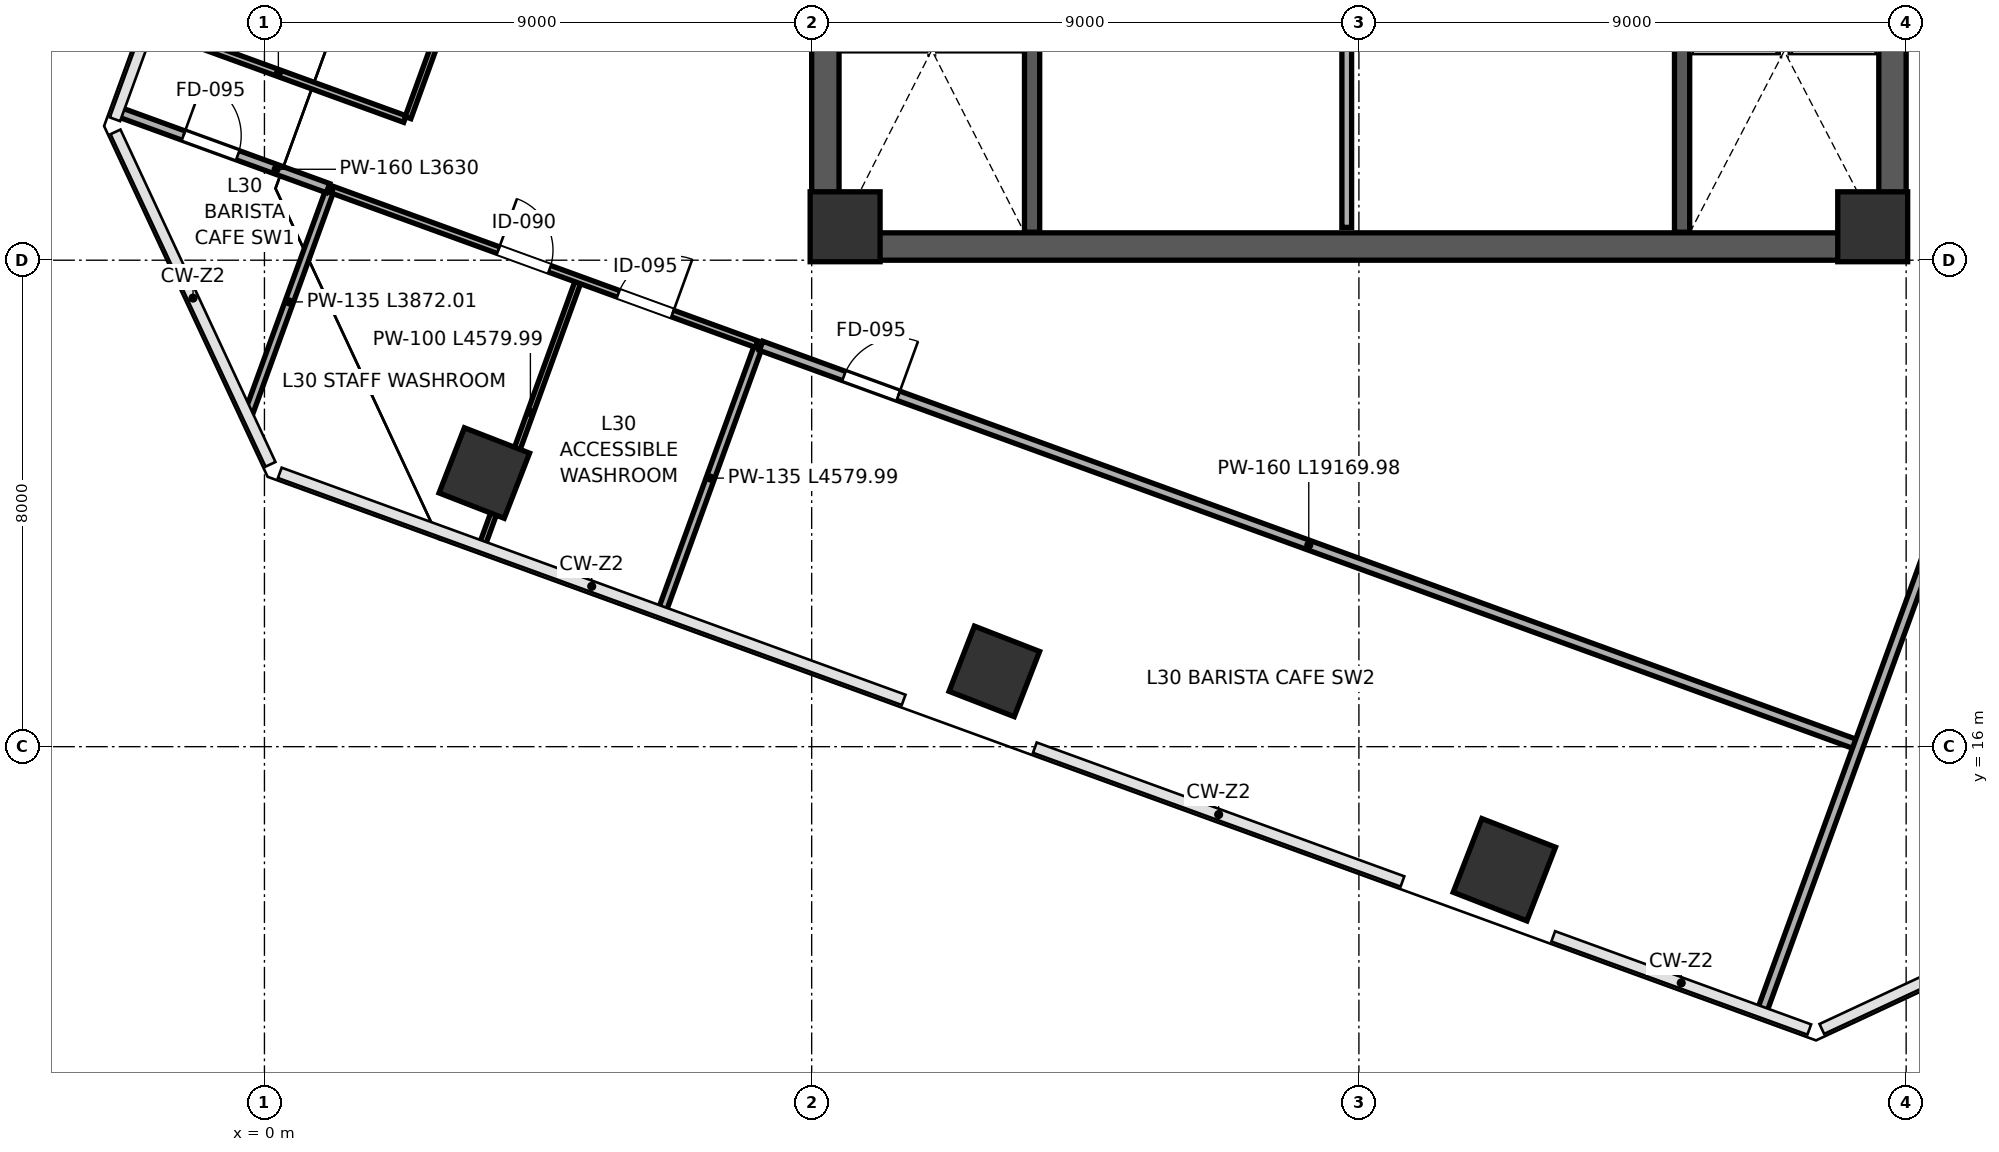
"""IFC4 building model, lengths in metres.
Left out: names, types, materials, properties, quantities, classifications, styles, units other than length and angle.
Written with IfcOpenShell. Run it as: python <this file> out.ifc"""

import sys

from ifc_helpers import new_model, si_unit, direction, frame, frame_2d, origin, origin_2d, place, context, subcontext, project, spatial, rectangle, extrude, clip, halfspace, source, transform, mapped, element, fill, save


model = new_model("IFC4")
c1 = context("Model", 3, precision=1e-05, world=origin(), true_north=direction((0.0, 1.0)))
c2 = subcontext(c1, "Body", "Model", "MODEL_VIEW")
j1 = project(units=[si_unit("LENGTHUNIT", "METRE"), si_unit("PLANEANGLEUNIT", "RADIAN")], contexts=[c1])
p1 = place(None, origin())
s1 = spatial("IfcSite", under=j1, at=p1, CompositionType="ELEMENT")
p2 = place(p1, origin())
s2 = spatial("IfcBuilding", under=s1, at=p2, CompositionType="ELEMENT")
p3 = place(p2, frame((0.0, 0.0, 137.2)))
s3 = spatial("IfcBuildingStorey", under=s2, at=p3, CompositionType="ELEMENT", Elevation=137.2)
m1 = source(origin(), c2, "Body", "SweptSolid", [
    extrude(rectangle(XDim=1.15, YDim=1.15, at=origin_2d()), origin(), (0.0, 0.0, 1.0), 4.198),
])
for number, where, z_axis, x_axis in (
    (1, (9.55, 24.55, 0.001), (0.0, 0.0, 1.0), (1.0, 0.0, 0.0)),
    (2, (26.45, 24.55, 0.001), (0.0, 0.0, 1.0), (1.0, 0.0, 0.0)),
):
    element("IfcColumn", number, at=place(p3, frame(where, z_axis=z_axis, x_axis=x_axis)), inside=s3, PredefinedType="COLUMN", context=c2, shape_type="MappedRepresentation", body=[
        mapped(m1, transform((0.0, 0.0, 0.0), scale=1.0)),
    ])
p4 = place(p3, frame((3.616, 20.5, 0.0), z_axis=(-0.058355947415, 0.092965068704, 0.993957785523), x_axis=(0.980902267341, 0.190389366909, 0.039782293708)))
e3 = element("IfcColumn", 3, at=p4, inside=s3, PredefinedType="COLUMN", context=c2, shape_type="Clipping", body=[
    clip(clip(extrude(rectangle(XDim=1.15, YDim=1.15, at=origin_2d()), origin(), (0.0, 0.0, 1.0), 4.226), halfspace(frame((0.0, 0.0, 0.083), z_axis=(0.0, 0.0, -1.0), x_axis=(1.0, 0.0, 0.0)), False)), halfspace(frame((0.0, 0.0, 4.143), z_axis=(0.0, 0.0, 1.0), x_axis=(1.0, 0.0, 0.0)), False)),
])
p5 = place(p3, frame((12.004, 17.238, 0.0), z_axis=(-0.075777308452, 0.049958607482, 0.995872450197), x_axis=(0.814345068086, 0.57944796761, 0.032896244729)))
e4 = element("IfcColumn", 4, at=p5, inside=s3, PredefinedType="COLUMN", context=c2, shape_type="Clipping", body=[
    clip(clip(extrude(rectangle(XDim=1.15, YDim=1.15, at=origin_2d()), origin(), (0.0, 0.0, 1.0), 4.217), halfspace(frame((0.0, 0.0, 0.069), z_axis=(0.0, 0.0, -1.0), x_axis=(1.0, 0.0, 0.0)), False)), halfspace(frame((0.0, 0.0, 4.149), z_axis=(0.0, 0.0, 1.0), x_axis=(1.0, 0.0, 0.0)), False)),
])
p6 = place(p3, frame((20.392, 13.976, 0.0), z_axis=(-0.093121667883, 0.006713557162, 0.995632102295), x_axis=(0.426939463159, 0.903646864246, 0.03383843283)))
e5 = element("IfcColumn", 5, at=p6, inside=s3, PredefinedType="COLUMN", context=c2, shape_type="Clipping", body=[
    clip(clip(extrude(rectangle(XDim=1.3, YDim=1.3, at=origin_2d()), origin(), (0.0, 0.0, 1.0), 4.218), halfspace(frame((0.0, 0.0, 0.08), z_axis=(0.0, 0.0, -1.0), x_axis=(1.0, 0.0, 0.0)), False)), halfspace(frame((0.0, 0.0, 4.139), z_axis=(0.0, 0.0, 1.0), x_axis=(1.0, 0.0, 0.0)), False)),
])
p7 = place(p3, frame((9.225, 24.45, 0.0), z_axis=(0.0, 0.0, 1.0), x_axis=(0.0, 1.0, 0.0)))
e6 = element("IfcWall", 6, at=p7, inside=s3, PredefinedType="SHEAR", context=c2, shape_type="SweptSolid", body=[
    extrude(rectangle(XDim=15.1, YDim=0.45, at=frame_2d((7.55, 0.0))), origin(), (0.0, 0.0, 1.0), 3.96),
])
p8 = place(p3, frame((26.775, 24.45, 0.0), z_axis=(0.0, 0.0, 1.0), x_axis=(0.0, 1.0, 0.0)))
e7 = element("IfcWall", 7, at=p8, inside=s3, PredefinedType="SHEAR", context=c2, shape_type="SweptSolid", body=[
    extrude(rectangle(XDim=15.1, YDim=0.45, at=frame_2d((7.55, 0.0))), origin(), (0.0, 0.0, 1.0), 3.96),
])
p9 = place(p8, frame((8.6, 0.0, 0.0)))
e8 = element("IfcOpeningElement", 8, at=p9, cuts=e7, PredefinedType="OPENING", context=c2, shape_type="SweptSolid", body=[
    extrude(rectangle(XDim=1.15, YDim=2.2, at=frame_2d((0.575, 1.1))), frame((0.0, 0.235, 0.0), z_axis=(0.0, -1.0, 0.0), x_axis=(1.0, 0.0, 0.0)), (0.0, 0.0, 1.0), 0.47),
])
p10 = place(p3, frame((9.0, 24.225, 0.0), z_axis=(0.0, 0.0, 1.0), x_axis=(1.0, 0.0, 0.0)))
e9 = element("IfcWall", 9, at=p10, inside=s3, PredefinedType="SHEAR", context=c2, shape_type="SweptSolid", body=[
    extrude(rectangle(XDim=18.0, YDim=0.45, at=frame_2d((9.0, 0.0))), origin(), (0.0, 0.0, 1.0), 3.96),
])
p11 = place(p3, frame((12.625, 24.46, 0.0), z_axis=(0.0, 0.0, 1.0), x_axis=(0.0, 1.0, 0.0)))
e10 = element("IfcWall", 10, at=p11, inside=s3, PredefinedType="SHEAR", context=c2, shape_type="SweptSolid", body=[
    extrude(rectangle(XDim=7.49, YDim=0.25, at=frame_2d((3.745, 0.0))), origin(), (0.0, 0.0, 1.0), 3.96),
])
p12 = place(p11, frame((5.85, 0.0, 0.0)))
e11 = element("IfcOpeningElement", 11, at=p12, cuts=e10, PredefinedType="OPENING", context=c2, shape_type="SweptSolid", body=[
    extrude(rectangle(XDim=1.15, YDim=2.2, at=frame_2d((0.575, 1.1))), frame((0.0, 0.135, 0.0), z_axis=(0.0, -1.0, 0.0), x_axis=(1.0, 0.0, 0.0)), (0.0, 0.0, 1.0), 0.27),
])
p13 = place(p3, frame((23.315, 24.46, 0.0), z_axis=(0.0, 0.0, 1.0), x_axis=(0.0, 1.0, 0.0)))
e12 = element("IfcWall", 12, at=p13, inside=s3, PredefinedType="SHEAR", context=c2, shape_type="SweptSolid", body=[
    extrude(rectangle(XDim=7.49, YDim=0.25, at=frame_2d((3.745, 0.0))), origin(), (0.0, 0.0, 1.0), 3.96),
])
p14 = place(p3, frame((17.8, 24.54, 0.0), z_axis=(0.0, 0.0, 1.0), x_axis=(0.0, 1.0, 0.0)))
e13 = element("IfcWall", 13, at=p14, inside=s3, PredefinedType="PARTITIONING", context=c2, shape_type="SweptSolid", body=[
    extrude(rectangle(XDim=4.6, YDim=0.16, at=frame_2d((2.3, 0.0))), origin(), (0.0, 0.0, 1.0), 3.96),
])
p15 = place(p3, frame((-0.255, 21.495, 0.0), z_axis=(0.0, 0.0, 1.0), x_axis=(0.342006312725, 0.939697654598, 0.0)))
e14 = element("IfcWall", 14, at=p15, inside=s3, PredefinedType="PARTITIONING", context=c2, shape_type="SweptSolid", body=[
    extrude(rectangle(XDim=3.872, YDim=0.135, at=frame_2d((1.936, 0.0))), origin(), (0.0, 0.0, 1.0), 3.96),
])
p16 = place(p3, frame((-2.365, 26.427, 0.0), z_axis=(0.0, 0.0, 1.0), x_axis=(0.939671610829, -0.342077862192, 0.0)))
e15 = element("IfcWall", 15, at=p16, inside=s3, PredefinedType="PARTITIONING", context=c2, shape_type="SweptSolid", body=[
    extrude(rectangle(XDim=3.63, YDim=0.16, at=frame_2d((1.815, 0.0))), origin(), (0.0, 0.0, 1.0), 3.96),
])
p17 = place(p16, frame((1.1, 0.0, 0.0)))
e16 = element("IfcOpeningElement", 16, at=p17, cuts=e15, PredefinedType="OPENING", context=c2, shape_type="SweptSolid", body=[
    extrude(rectangle(XDim=0.95, YDim=2.15, at=frame_2d((0.475, 1.075))), frame((0.0, 0.09, 0.0), z_axis=(0.0, -1.0, 0.0), x_axis=(1.0, 0.0, 0.0)), (0.0, 0.0, 1.0), 0.18),
])
p18 = place(p3, frame((3.591, 19.342, 0.0), z_axis=(0.0, 0.0, 1.0), x_axis=(0.341969903355, 0.939710905119, 0.0)))
e17 = element("IfcWall", 17, at=p18, inside=s3, PredefinedType="PARTITIONING", context=c2, shape_type="SweptSolid", body=[
    extrude(rectangle(XDim=4.58, YDim=0.1, at=frame_2d((2.29, 0.0))), origin(), (0.0, 0.0, 1.0), 3.195),
])
p19 = place(p3, frame((6.551, 18.265, 0.0), z_axis=(0.0, 0.0, 1.0), x_axis=(0.342016975922, 0.939693773621, 0.0)))
e18 = element("IfcWall", 18, at=p19, inside=s3, PredefinedType="PARTITIONING", context=c2, shape_type="SweptSolid", body=[
    extrude(rectangle(XDim=4.58, YDim=0.135, at=frame_2d((2.29, 0.0))), origin(), (0.0, 0.0, 1.0), 3.195),
])
p20 = place(p3, frame((1.121, 25.157, 0.0), z_axis=(0.0, 0.0, 1.0), x_axis=(0.939692513883, -0.342020437038, 0.0)))
e19 = element("IfcWall", 19, at=p20, inside=s3, PredefinedType="PARTITIONING", context=c2, shape_type="SweptSolid", body=[
    extrude(rectangle(XDim=7.42, YDim=0.115, at=frame_2d((3.71, 0.0))), origin(), (0.0, 0.0, 1.0), 3.96),
])
p21 = place(p20, frame((2.9, 0.0, 0.0)))
e20 = element("IfcOpeningElement", 20, at=p21, cuts=e19, PredefinedType="OPENING", context=c2, shape_type="SweptSolid", body=[
    extrude(rectangle(XDim=0.9, YDim=2.15, at=frame_2d((0.45, 1.075))), frame((0.0, 0.067, 0.0), z_axis=(0.0, -1.0, 0.0), x_axis=(1.0, 0.0, 0.0)), (0.0, 0.0, 1.0), 0.135),
])
p22 = place(p20, frame((5.0, 0.0, 0.0)))
e21 = element("IfcOpeningElement", 21, at=p22, cuts=e19, PredefinedType="OPENING", context=c2, shape_type="SweptSolid", body=[
    extrude(rectangle(XDim=0.95, YDim=2.15, at=frame_2d((0.475, 1.075))), frame((0.0, 0.067, 0.0), z_axis=(0.0, -1.0, 0.0), x_axis=(1.0, 0.0, 0.0)), (0.0, 0.0, 1.0), 0.135),
])
p23 = place(p3, frame((8.168, 22.592, 0.0), z_axis=(0.0, 0.0, 1.0), x_axis=(0.939694846349, -0.342014028579, 0.0)))
e22 = element("IfcWall", 22, at=p23, inside=s3, PredefinedType="PARTITIONING", context=c2, shape_type="SweptSolid", body=[
    extrude(rectangle(XDim=19.17, YDim=0.16, at=frame_2d((9.585, 0.0))), origin(), (0.0, 0.0, 1.0), 3.96),
])
p24 = place(p23, frame((1.45, 0.0, 0.0)))
e23 = element("IfcOpeningElement", 23, at=p24, cuts=e22, PredefinedType="OPENING", context=c2, shape_type="SweptSolid", body=[
    extrude(rectangle(XDim=0.95, YDim=2.15, at=frame_2d((0.475, 1.075))), frame((0.0, 0.09, 0.0), z_axis=(0.0, -1.0, 0.0), x_axis=(1.0, 0.0, 0.0)), (0.0, 0.0, 1.0), 0.18),
])
p25 = place(p3, frame((-1.853, 27.836, 0.0), z_axis=(0.0, 0.0, 1.0), x_axis=(0.939693620895, -0.342017395535, 0.0)))
e24 = element("IfcWall", 24, at=p25, inside=s3, PredefinedType="PARTITIONING", context=c2, shape_type="SweptSolid", body=[
    extrude(rectangle(XDim=4.43, YDim=0.115, at=frame_2d((2.215, 0.0))), origin(), (0.0, 0.0, 1.0), 3.96),
])
p26 = place(p3, frame((2.362, 26.345, 0.0), z_axis=(0.0, 0.0, 1.0), x_axis=(0.342021727767, 0.939692044095, 0.0)))
e25 = element("IfcWall", 25, at=p26, inside=s3, PredefinedType="PARTITIONING", context=c2, shape_type="SweptSolid", body=[
    extrude(rectangle(XDim=22.72, YDim=0.1, at=frame_2d((11.36, 0.0))), origin(), (0.0, 0.0, 1.0), 3.96),
])
p27 = place(p26, frame((6.2, 0.0, 0.0)))
e26 = element("IfcOpeningElement", 26, at=p27, cuts=e25, PredefinedType="OPENING", context=c2, shape_type="SweptSolid", body=[
    extrude(rectangle(XDim=0.95, YDim=2.15, at=frame_2d((0.475, 1.075))), frame((0.0, 0.06, 0.0), z_axis=(0.0, -1.0, 0.0), x_axis=(1.0, 0.0, 0.0)), (0.0, 0.0, 1.0), 0.12),
])
p28 = place(p3, frame((24.64, 11.681, 0.0), z_axis=(0.0, 0.0, 1.0), x_axis=(0.342014151498, 0.939694801611, 0.0)))
e27 = element("IfcWall", 27, at=p28, inside=s3, PredefinedType="PARTITIONING", context=c2, shape_type="SweptSolid", body=[
    extrude(rectangle(XDim=20.68, YDim=0.16, at=frame_2d((10.34, 0.0))), origin(), (0.0, 0.0, 1.0), 3.96),
])
m2 = source(origin(), c2, "Body", "SweptSolid", [
    extrude(rectangle(XDim=0.95, YDim=2.15, at=frame_2d((0.475, 1.075))), frame((0.0, 0.025, 0.0), z_axis=(0.0, -1.0, 0.0), x_axis=(1.0, 0.0, 0.0)), (0.0, 0.0, 1.0), 0.05),
])
p29 = place(p17, origin())
e28 = element("IfcDoor", 28, at=p29, inside=s3, OperationType="SINGLE_SWING_LEFT", PredefinedType="DOOR", context=c2, shape_type="MappedRepresentation", body=[
    mapped(m2, transform((0.0, 0.0, 0.0), scale=1.0)),
])
fill(e16, e28)
m3 = source(origin(), c2, "Body", "SweptSolid", [
    extrude(rectangle(XDim=0.9, YDim=2.15, at=frame_2d((0.45, 1.075))), frame((0.0, 0.025, 0.0), z_axis=(0.0, -1.0, 0.0), x_axis=(1.0, 0.0, 0.0)), (0.0, 0.0, 1.0), 0.05),
])
p30 = place(p21, origin())
e29 = element("IfcDoor", 29, at=p30, inside=s3, OperationType="SINGLE_SWING_LEFT", PredefinedType="DOOR", context=c2, shape_type="MappedRepresentation", body=[
    mapped(m3, transform((0.0, 0.0, 0.0), scale=1.0)),
])
fill(e20, e29)
m4 = source(origin(), c2, "Body", "SweptSolid", [
    extrude(rectangle(XDim=0.95, YDim=2.15, at=frame_2d((0.475, 1.075))), frame((0.0, 0.025, 0.0), z_axis=(0.0, -1.0, 0.0), x_axis=(1.0, 0.0, 0.0)), (0.0, 0.0, 1.0), 0.05),
])
p31 = place(p22, origin())
e30 = element("IfcDoor", 30, at=p31, inside=s3, OperationType="SINGLE_SWING_RIGHT", PredefinedType="DOOR", context=c2, shape_type="MappedRepresentation", body=[
    mapped(m4, transform((0.0, 0.0, 0.0), scale=1.0)),
])
fill(e21, e30)
p32 = place(p24, origin())
e31 = element("IfcDoor", 31, at=p32, inside=s3, OperationType="SINGLE_SWING_RIGHT", PredefinedType="DOOR", context=c2, shape_type="MappedRepresentation", body=[
    mapped(m2, transform((0.0, 0.0, 0.0), scale=1.0)),
])
fill(e23, e31)
save(model, sys.argv[1])
